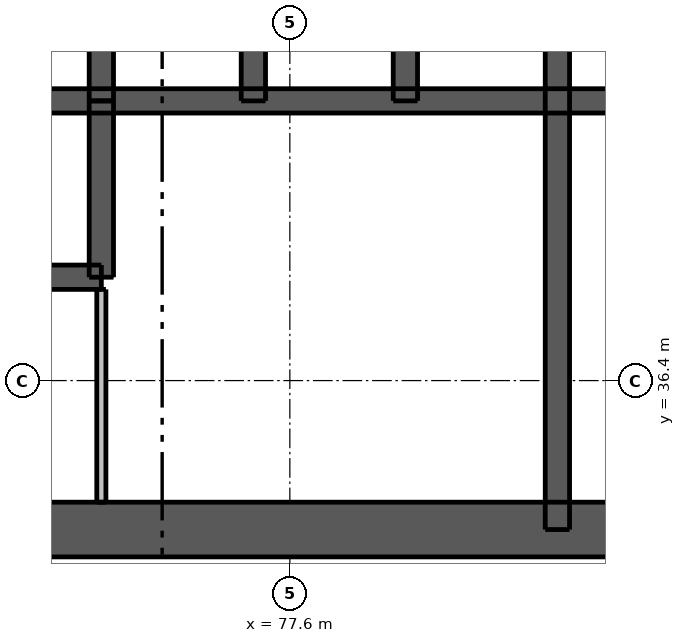
"""IFC4 building model, lengths in metres.
Left out: names, types, materials, properties, quantities, classifications, styles, units other than length and angle.
Written with IfcOpenShell. Run it as: python <this file> out.ifc"""

import sys

from ifc_helpers import new_model, si_unit, direction, frame, frame_2d, origin, place, context, subcontext, project, spatial, rectangle, extrude, element, fill, save


model = new_model("IFC4")
c1 = context("Model", 3, precision=1e-05, world=origin(), true_north=direction((0.0, 1.0)))
c2 = subcontext(c1, "Body", "Model", "MODEL_VIEW")
j1 = project(units=[si_unit("LENGTHUNIT", "METRE"), si_unit("PLANEANGLEUNIT", "RADIAN")], contexts=[c1])
p1 = place(None, origin())
s1 = spatial("IfcSite", under=j1, at=p1, CompositionType="ELEMENT")
p2 = place(p1, origin())
s2 = spatial("IfcBuilding", under=s1, at=p2, CompositionType="ELEMENT")
p3 = place(p2, frame((0.0, 0.0, 26.8)))
s3 = spatial("IfcBuildingStorey", under=s2, at=p3, CompositionType="ELEMENT", Elevation=26.8)
p4 = place(p3, frame((62.5, 33.95, 0.0), z_axis=(0.0, 0.0, 1.0), x_axis=(1.0, 0.0, 0.0)))
e1 = element("IfcWall", 1, at=p4, inside=s3, PredefinedType="SHEAR", context=c2, shape_type="SweptSolid", body=[
    extrude(rectangle(XDim=24.0, YDim=0.9, at=frame_2d((12.0, 0.0))), origin(), (0.0, 0.0, 1.0), 3.05),
])
p5 = place(p4, frame((2.05, 0.0, 0.0)))
e2 = element("IfcOpeningElement", 2, at=p5, cuts=e1, PredefinedType="OPENING", context=c2, shape_type="SweptSolid", body=[
    extrude(rectangle(XDim=1.1, YDim=2.1, at=frame_2d((0.55, 1.05))), frame((0.0, 0.46, 0.0), z_axis=(0.0, -1.0, 0.0), x_axis=(1.0, 0.0, 0.0)), (0.0, 0.0, 1.0), 0.92),
])
p6 = place(p4, frame((20.85, 0.0, 0.0)))
e3 = element("IfcOpeningElement", 3, at=p6, cuts=e1, PredefinedType="OPENING", context=c2, shape_type="SweptSolid", body=[
    extrude(rectangle(XDim=1.1, YDim=2.1, at=frame_2d((0.55, 1.05))), frame((0.0, 0.46, 0.0), z_axis=(0.0, -1.0, 0.0), x_axis=(1.0, 0.0, 0.0)), (0.0, 0.0, 1.0), 0.92),
])
p7 = place(p4, frame((8.0, 0.0, 0.0)))
e4 = element("IfcOpeningElement", 4, at=p7, cuts=e1, PredefinedType="OPENING", context=c2, shape_type="SweptSolid", body=[
    extrude(rectangle(XDim=1.1, YDim=2.1, at=frame_2d((0.55, 1.05))), frame((0.0, 0.46, 0.0), z_axis=(0.0, -1.0, 0.0), x_axis=(1.0, 0.0, 0.0)), (0.0, 0.0, 1.0), 0.92),
])
p8 = place(p4, frame((15.3, 0.0, 0.0)))
e5 = element("IfcOpeningElement", 5, at=p8, cuts=e1, PredefinedType="OPENING", context=c2, shape_type="SweptSolid", body=[
    extrude(rectangle(XDim=0.9, YDim=2.1, at=frame_2d((0.45, 1.05))), frame((0.0, 0.46, 0.0), z_axis=(0.0, -1.0, 0.0), x_axis=(1.0, 0.0, 0.0)), (0.0, 0.0, 1.0), 0.92),
])
p9 = place(p3, frame((62.95, 41.0, 0.0), z_axis=(0.0, 0.0, 1.0), x_axis=(1.0, 0.0, 0.0)))
e6 = element("IfcWall", 6, at=p9, inside=s3, PredefinedType="SHEAR", context=c2, shape_type="SweptSolid", body=[
    extrude(rectangle(XDim=23.1, YDim=0.4, at=frame_2d((11.55, 0.0))), origin(), (0.0, 0.0, 1.0), 3.05),
])
p10 = place(p3, frame((82.0, 33.95, 0.0), z_axis=(0.0, 0.0, 1.0), x_axis=(0.0, 1.0, 0.0)))
e7 = element("IfcWall", 7, at=p10, inside=s3, PredefinedType="SHEAR", context=c2, shape_type="SweptSolid", body=[
    extrude(rectangle(XDim=9.95, YDim=0.4, at=frame_2d((4.975, 0.0))), origin(), (0.0, 0.0, 1.0), 3.05),
])
for number, where, z_axis, x_axis in (
    (8, (74.5, 41.0, 0.0), (0.0, 0.0, 1.0), (0.0, 1.0, 0.0)),
    (9, (77.0, 41.0, 0.0), (0.0, 0.0, 1.0), (0.0, 1.0, 0.0)),
    (10, (79.5, 41.0, 0.0), (0.0, 0.0, 1.0), (0.0, 1.0, 0.0)),
):
    element("IfcWall", number, at=place(p3, frame(where, z_axis=z_axis, x_axis=x_axis)), inside=s3, PredefinedType="SHEAR", context=c2, shape_type="SweptSolid", body=[
        extrude(rectangle(XDim=2.9, YDim=0.4, at=frame_2d((1.45, 0.0))), origin(), (0.0, 0.0, 1.0), 3.05),
    ])
p11 = place(p3, frame((67.0, 38.1, 0.0), z_axis=(0.0, 0.0, 1.0), x_axis=(1.0, 0.0, 0.0)))
e11 = element("IfcWall", 11, at=p11, inside=s3, PredefinedType="SHEAR", context=c2, shape_type="SweptSolid", body=[
    extrude(rectangle(XDim=7.5, YDim=0.4, at=frame_2d((3.75, 0.0))), origin(), (0.0, 0.0, 1.0), 3.05),
])
p12 = place(p11, frame((0.7, 0.0, 0.0)))
e12 = element("IfcOpeningElement", 12, at=p12, cuts=e11, PredefinedType="OPENING", context=c2, shape_type="SweptSolid", body=[
    extrude(rectangle(XDim=1.1, YDim=2.1, at=frame_2d((0.55, 1.05))), frame((0.0, 0.21, 0.0), z_axis=(0.0, -1.0, 0.0), x_axis=(1.0, 0.0, 0.0)), (0.0, 0.0, 1.0), 0.42),
])
p13 = place(p11, frame((3.2, 0.0, 0.0)))
e13 = element("IfcOpeningElement", 13, at=p13, cuts=e11, PredefinedType="OPENING", context=c2, shape_type="SweptSolid", body=[
    extrude(rectangle(XDim=1.1, YDim=2.1, at=frame_2d((0.55, 1.05))), frame((0.0, 0.21, 0.0), z_axis=(0.0, -1.0, 0.0), x_axis=(1.0, 0.0, 0.0)), (0.0, 0.0, 1.0), 0.42),
])
p14 = place(p11, frame((5.65, 0.0, 0.0)))
e14 = element("IfcOpeningElement", 14, at=p14, cuts=e11, PredefinedType="OPENING", context=c2, shape_type="SweptSolid", body=[
    extrude(rectangle(XDim=1.2, YDim=2.1, at=frame_2d((0.6, 1.05))), frame((0.0, 0.21, 0.0), z_axis=(0.0, -1.0, 0.0), x_axis=(1.0, 0.0, 0.0)), (0.0, 0.0, 1.0), 0.42),
])
p15 = place(p3, frame((74.5, 38.1, 0.0), z_axis=(0.0, 0.0, 1.0), x_axis=(0.0, 1.0, 0.0)))
e15 = element("IfcWall", 15, at=p15, inside=s3, PredefinedType="SHEAR", context=c2, shape_type="SweptSolid", body=[
    extrude(rectangle(XDim=2.9, YDim=0.4, at=frame_2d((1.45, 0.0))), origin(), (0.0, 0.0, 1.0), 3.05),
])
p16 = place(p3, frame((74.5, 34.4, 0.0), z_axis=(0.0, 0.0, 1.0), x_axis=(0.0, 1.0, 0.0)))
e16 = element("IfcWall", 16, at=p16, inside=s3, PredefinedType="PLUMBINGWALL", context=c2, shape_type="SweptSolid", body=[
    extrude(rectangle(XDim=3.5, YDim=0.15, at=frame_2d((1.75, 0.0))), origin(), (0.0, 0.0, 1.0), 3.05),
])
p17 = place(p8, origin())
e17 = element("IfcDoor", 17, at=p17, inside=s3, OperationType="SINGLE_SWING_LEFT", PredefinedType="DOOR", context=c2, shape_type="SweptSolid", body=[
    extrude(rectangle(XDim=0.9, YDim=2.1, at=frame_2d((0.45, 1.05))), frame((0.0, 0.438, 0.0), z_axis=(0.0, -1.0, 0.0), x_axis=(1.0, 0.0, 0.0)), (0.0, 0.0, 1.0), 0.05),
])
fill(e5, e17)
p18 = place(p14, origin())
e18 = element("IfcDoor", 18, at=p18, inside=s3, OperationType="DOUBLE_DOOR_SLIDING", PredefinedType="DOOR", context=c2, shape_type="SweptSolid", body=[
    extrude(rectangle(XDim=1.2, YDim=2.1, at=frame_2d((0.6, 1.05))), frame((0.0, 0.025, 0.0), z_axis=(0.0, -1.0, 0.0), x_axis=(1.0, 0.0, 0.0)), (0.0, 0.0, 1.0), 0.05),
])
fill(e14, e18)
save(model, sys.argv[1])
